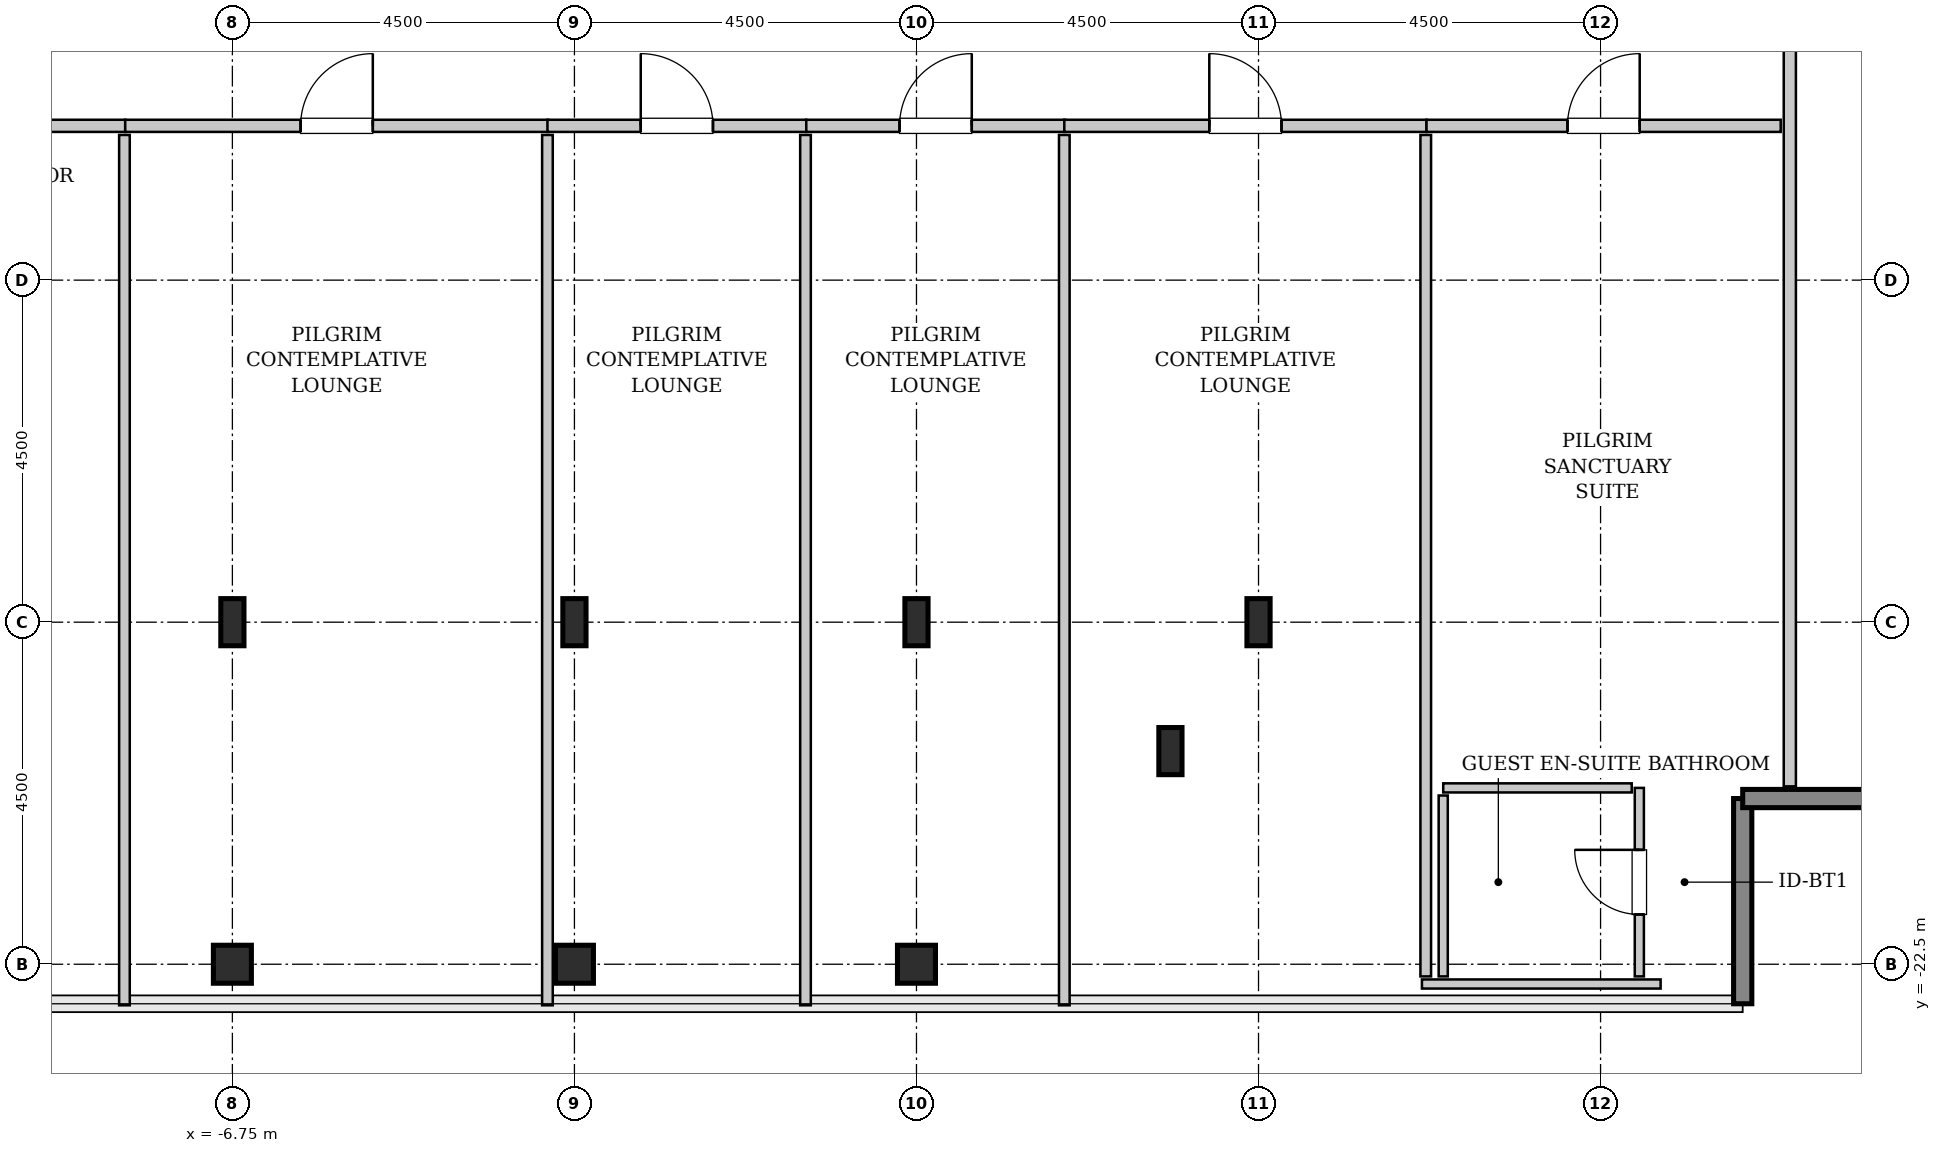
"""IFC4 building model, lengths in metres.
Left out: names, types, materials, properties, quantities, classifications, styles, units other than length and angle.
Written with IfcOpenShell. Run it as: python <this file> out.ifc"""

import sys

from ifc_helpers import new_model, si_unit, direction, frame, frame_2d, origin, origin_2d, place, context, subcontext, project, spatial, rectangle, hollow_rectangle, i_section, extrude, source, transform, mapped, element, fill, save


model = new_model("IFC4")
c1 = context("Model", 3, precision=1e-05, world=origin(), true_north=direction((0.0, 1.0)))
c2 = subcontext(c1, "Body", "Model", "MODEL_VIEW")
j1 = project(units=[si_unit("LENGTHUNIT", "METRE"), si_unit("PLANEANGLEUNIT", "RADIAN")], contexts=[c1])
p1 = place(None, origin())
s1 = spatial("IfcSite", under=j1, at=p1, CompositionType="ELEMENT")
p2 = place(p1, origin())
s2 = spatial("IfcBuilding", under=s1, at=p2, CompositionType="ELEMENT")
p3 = place(p2, frame((0.0, 0.0, 337.6)))
s3 = spatial("IfcBuildingStorey", under=s2, at=p3, CompositionType="ELEMENT", Elevation=337.6)
m1 = source(origin(), c2, "Body", "SweptSolid", [
    extrude(hollow_rectangle(XDim=0.5, YDim=0.5, WallThickness=0.025, InnerFilletRadius=0.025, OuterFilletRadius=0.05, at=origin_2d()), origin(), (0.0, 0.0, 1.0), 3.8),
])
p4 = place(p3, frame((-6.75, -22.5, 0.0), z_axis=(0.0, 0.0, 1.0), x_axis=(1.0, 0.0, 0.0)))
e1 = element("IfcColumn", 1, at=p4, inside=s3, PredefinedType="COLUMN", context=c2, shape_type="MappedRepresentation", body=[
    mapped(m1, transform((0.0, 0.0, 0.0), x_axis=(1.0, 0.0, 0.0), y_axis=(0.0, 1.0, 0.0), z_axis=(0.0, 0.0, 1.0), scale=1.0)),
])
m2 = source(origin(), c2, "Body", "SweptSolid", [
    extrude(i_section(OverallWidth=0.305, OverallDepth=0.62, WebThickness=0.021, FlangeThickness=0.04, FilletRadius=0.027, at=origin_2d()), origin(), (0.0, 0.0, 1.0), 3.8),
])
p5 = place(p3, frame((-6.75, -18.0, 0.0), z_axis=(0.0, 0.0, 1.0), x_axis=(1.0, 0.0, 0.0)))
e2 = element("IfcColumn", 2, at=p5, inside=s3, PredefinedType="COLUMN", context=c2, shape_type="MappedRepresentation", body=[
    mapped(m2, transform((0.0, 0.0, 0.0), x_axis=(1.0, 0.0, 0.0), y_axis=(0.0, 1.0, 0.0), z_axis=(0.0, 0.0, 1.0), scale=1.0)),
])
p6 = place(p3, frame((-2.25, -22.5, 0.0), z_axis=(0.0, 0.0, 1.0), x_axis=(1.0, 0.0, 0.0)))
e3 = element("IfcColumn", 3, at=p6, inside=s3, PredefinedType="COLUMN", context=c2, shape_type="MappedRepresentation", body=[
    mapped(m1, transform((0.0, 0.0, 0.0), x_axis=(1.0, 0.0, 0.0), y_axis=(0.0, 1.0, 0.0), z_axis=(0.0, 0.0, 1.0), scale=1.0)),
])
p7 = place(p3, frame((-2.25, -18.0, 0.0), z_axis=(0.0, 0.0, 1.0), x_axis=(1.0, 0.0, 0.0)))
e4 = element("IfcColumn", 4, at=p7, inside=s3, PredefinedType="COLUMN", context=c2, shape_type="MappedRepresentation", body=[
    mapped(m2, transform((0.0, 0.0, 0.0), x_axis=(1.0, 0.0, 0.0), y_axis=(0.0, 1.0, 0.0), z_axis=(0.0, 0.0, 1.0), scale=1.0)),
])
p8 = place(p3, frame((2.25, -22.5, 0.0), z_axis=(0.0, 0.0, 1.0), x_axis=(1.0, 0.0, 0.0)))
e5 = element("IfcColumn", 5, at=p8, inside=s3, PredefinedType="COLUMN", context=c2, shape_type="MappedRepresentation", body=[
    mapped(m1, transform((0.0, 0.0, 0.0), x_axis=(1.0, 0.0, 0.0), y_axis=(0.0, 1.0, 0.0), z_axis=(0.0, 0.0, 1.0), scale=1.0)),
])
for number, where, z_axis, x_axis in (
    (6, (2.25, -18.0, 0.0), (0.0, 0.0, 1.0), (1.0, 0.0, 0.0)),
    (7, (5.591, -19.696, 0.0), (0.0, 0.0, 1.0), (1.0, 0.0, 0.0)),
    (8, (6.75, -18.0, 0.0), (0.0, 0.0, 1.0), (1.0, 0.0, 0.0)),
):
    element("IfcColumn", number, at=place(p3, frame(where, z_axis=z_axis, x_axis=x_axis)), inside=s3, PredefinedType="COLUMN", context=c2, shape_type="MappedRepresentation", body=[
        mapped(m2, transform((0.0, 0.0, 0.0), x_axis=(1.0, 0.0, 0.0), y_axis=(0.0, 1.0, 0.0), z_axis=(0.0, 0.0, 1.0), scale=1.0)),
    ])
m3 = source(origin(), c2, "Body", "SweptSolid", [
    extrude(rectangle(XDim=2.7, YDim=0.24, at=frame_2d((1.35, 0.0))), origin(), (0.0, 0.0, 1.0), 3.55),
])
for number, where, z_axis, x_axis in (
    (9, (13.12, -23.02, 0.0), (0.0, 0.0, 1.0), (0.0, 1.0, 0.0)),
    (10, (13.12, -20.32, 0.0), (0.0, 0.0, 1.0), (1.0, 0.0, 0.0)),
):
    element("IfcWall", number, at=place(p3, frame(where, z_axis=z_axis, x_axis=x_axis)), inside=s3, PredefinedType="SHEAR", context=c2, shape_type="MappedRepresentation", body=[
        mapped(m3, transform((0.0, 0.0, 0.0), x_axis=(1.0, 0.0, 0.0), y_axis=(0.0, 1.0, 0.0), z_axis=(0.0, 0.0, 1.0), scale=1.0)),
    ])
m4 = source(origin(), c2, "Body", "SweptSolid", [
    extrude(rectangle(XDim=3.14, YDim=0.12, at=frame_2d((1.57, 0.0))), origin(), (0.0, 0.0, 1.0), 3.535),
])
p9 = place(p3, frame((8.9, -22.76, 0.0), z_axis=(0.0, 0.0, 1.0), x_axis=(1.0, 0.0, 0.0)))
e11 = element("IfcWall", 11, at=p9, inside=s3, PredefinedType="PLUMBINGWALL", context=c2, shape_type="MappedRepresentation", body=[
    mapped(m4, transform((0.0, 0.0, 0.0), x_axis=(1.0, 0.0, 0.0), y_axis=(0.0, 1.0, 0.0), z_axis=(0.0, 0.0, 1.0), scale=1.0)),
])
m5 = source(origin(), c2, "Body", "SweptSolid", [
    extrude(rectangle(XDim=2.48, YDim=0.12, at=frame_2d((1.24, 0.0))), origin(), (0.0, 0.0, 1.0), 3.535),
])
p10 = place(p3, frame((11.76, -22.66, 0.0), z_axis=(0.0, 0.0, 1.0), x_axis=(0.0, 1.0, 0.0)))
e12 = element("IfcWall", 12, at=p10, inside=s3, PredefinedType="PLUMBINGWALL", context=c2, shape_type="MappedRepresentation", body=[
    mapped(m5, transform((0.0, 0.0, 0.0), x_axis=(1.0, 0.0, 0.0), y_axis=(0.0, 1.0, 0.0), z_axis=(0.0, 0.0, 1.0), scale=1.0)),
])
p11 = place(p10, frame((0.815, 0.0, 0.0)))
e13 = element("IfcOpeningElement", 13, at=p11, cuts=e12, PredefinedType="OPENING", context=c2, shape_type="SweptSolid", body=[
    extrude(rectangle(XDim=0.85, YDim=2.1, at=frame_2d((0.425, 1.05))), frame((0.0, 0.07, 0.0), z_axis=(0.0, -1.0, 0.0), x_axis=(1.0, 0.0, 0.0)), (0.0, 0.0, 1.0), 0.14),
])
p12 = place(p3, frame((9.18, -20.18, 0.0), z_axis=(0.0, 0.0, 1.0), x_axis=(1.0, 0.0, 0.0)))
e14 = element("IfcWall", 14, at=p12, inside=s3, PredefinedType="PLUMBINGWALL", context=c2, shape_type="MappedRepresentation", body=[
    mapped(m5, transform((0.0, 0.0, 0.0), x_axis=(1.0, 0.0, 0.0), y_axis=(0.0, 1.0, 0.0), z_axis=(0.0, 0.0, 1.0), scale=1.0)),
])
m6 = source(origin(), c2, "Body", "SweptSolid", [
    extrude(rectangle(XDim=2.38, YDim=0.12, at=frame_2d((1.19, 0.0))), origin(), (0.0, 0.0, 1.0), 3.535),
])
p13 = place(p3, frame((9.18, -22.66, 0.0), z_axis=(0.0, 0.0, 1.0), x_axis=(0.0, 1.0, 0.0)))
e15 = element("IfcWall", 15, at=p13, inside=s3, PredefinedType="PLUMBINGWALL", context=c2, shape_type="MappedRepresentation", body=[
    mapped(m6, transform((0.0, 0.0, 0.0), x_axis=(1.0, 0.0, 0.0), y_axis=(0.0, 1.0, 0.0), z_axis=(0.0, 0.0, 1.0), scale=1.0)),
])
m7 = source(origin(), c2, "Body", "SweptSolid", [
    extrude(rectangle(XDim=16.965, YDim=0.16, at=frame_2d((8.482, 0.0))), origin(), (0.0, 0.0, 1.0), 3.535),
])
p14 = place(p3, frame((13.74, -20.16, 0.0), z_axis=(0.0, 0.0, 1.0), x_axis=(0.0, 1.0, 0.0)))
e16 = element("IfcWall", 16, at=p14, inside=s3, PredefinedType="PARTITIONING", context=c2, shape_type="MappedRepresentation", body=[
    mapped(m7, transform((0.0, 0.0, 0.0), x_axis=(1.0, 0.0, 0.0), y_axis=(0.0, 1.0, 0.0), z_axis=(0.0, 0.0, 1.0), scale=1.0)),
])
p15 = place(p14, frame((12.333, 0.0, 0.0)))
e17 = element("IfcOpeningElement", 17, at=p15, cuts=e16, PredefinedType="OPENING", context=c2, shape_type="SweptSolid", body=[
    extrude(rectangle(XDim=0.95, YDim=2.1, at=frame_2d((0.475, 1.05))), frame((0.0, 0.09, 0.0), z_axis=(0.0, -1.0, 0.0), x_axis=(1.0, 0.0, 0.0)), (0.0, 0.0, 1.0), 0.18),
])
m8 = source(origin(), c2, "Body", "SweptSolid", [
    extrude(rectangle(XDim=5.46, YDim=0.16, at=frame_2d((2.73, 0.0))), origin(), (0.0, 0.0, 1.0), 3.535),
])
p16 = place(p3, frame((-13.62, -11.47, 0.0), z_axis=(0.0, 0.0, 1.0), x_axis=(1.0, 0.0, 0.0)))
e18 = element("IfcWall", 18, at=p16, inside=s3, PredefinedType="PARTITIONING", context=c2, shape_type="MappedRepresentation", body=[
    mapped(m8, transform((0.0, 0.0, 0.0), x_axis=(1.0, 0.0, 0.0), y_axis=(0.0, 1.0, 0.0), z_axis=(0.0, 0.0, 1.0), scale=1.0)),
])
p17 = place(p16, frame((2.255, 0.0, 0.0)))
e19 = element("IfcOpeningElement", 19, at=p17, cuts=e18, PredefinedType="OPENING", context=c2, shape_type="SweptSolid", body=[
    extrude(rectangle(XDim=0.95, YDim=2.1, at=frame_2d((0.475, 1.05))), frame((0.0, 0.09, 0.0), z_axis=(0.0, -1.0, 0.0), x_axis=(1.0, 0.0, 0.0)), (0.0, 0.0, 1.0), 0.18),
])
m9 = source(origin(), c2, "Body", "SweptSolid", [
    extrude(rectangle(XDim=11.45, YDim=0.14, at=frame_2d((5.725, 0.0))), origin(), (0.0, 0.0, 1.0), 3.535),
])
p18 = place(p3, frame((-8.17, -23.04, 0.0), z_axis=(0.0, 0.0, 1.0), x_axis=(0.0, 1.0, 0.0)))
e20 = element("IfcWall", 20, at=p18, inside=s3, PredefinedType="PARTITIONING", context=c2, shape_type="MappedRepresentation", body=[
    mapped(m9, transform((0.0, 0.0, 0.0), x_axis=(1.0, 0.0, 0.0), y_axis=(0.0, 1.0, 0.0), z_axis=(0.0, 0.0, 1.0), scale=1.0)),
])
m10 = source(origin(), c2, "Body", "SweptSolid", [
    extrude(rectangle(XDim=5.565, YDim=0.16, at=frame_2d((2.782, 0.0))), origin(), (0.0, 0.0, 1.0), 3.535),
])
p19 = place(p3, frame((-8.16, -11.47, 0.0), z_axis=(0.0, 0.0, 1.0), x_axis=(1.0, 0.0, 0.0)))
e21 = element("IfcWall", 21, at=p19, inside=s3, PredefinedType="PARTITIONING", context=c2, shape_type="MappedRepresentation", body=[
    mapped(m10, transform((0.0, 0.0, 0.0), x_axis=(1.0, 0.0, 0.0), y_axis=(0.0, 1.0, 0.0), z_axis=(0.0, 0.0, 1.0), scale=1.0)),
])
p20 = place(p19, frame((2.308, 0.0, 0.0)))
e22 = element("IfcOpeningElement", 22, at=p20, cuts=e21, PredefinedType="OPENING", context=c2, shape_type="SweptSolid", body=[
    extrude(rectangle(XDim=0.95, YDim=2.1, at=frame_2d((0.475, 1.05))), frame((0.0, 0.09, 0.0), z_axis=(0.0, -1.0, 0.0), x_axis=(1.0, 0.0, 0.0)), (0.0, 0.0, 1.0), 0.18),
])
m11 = source(origin(), c2, "Body", "SweptSolid", [
    extrude(rectangle(XDim=11.45, YDim=0.14, at=frame_2d((5.725, 0.0))), origin(), (0.0, 0.0, 1.0), 2.975),
])
p21 = place(p3, frame((-2.605, -23.04, 0.0), z_axis=(0.0, 0.0, 1.0), x_axis=(0.0, 1.0, 0.0)))
e23 = element("IfcWall", 23, at=p21, inside=s3, PredefinedType="PARTITIONING", context=c2, shape_type="MappedRepresentation", body=[
    mapped(m11, transform((0.0, 0.0, 0.0), x_axis=(1.0, 0.0, 0.0), y_axis=(0.0, 1.0, 0.0), z_axis=(0.0, 0.0, 1.0), scale=1.0)),
])
m12 = source(origin(), c2, "Body", "SweptSolid", [
    extrude(rectangle(XDim=3.405, YDim=0.16, at=frame_2d((1.703, 0.0))), origin(), (0.0, 0.0, 1.0), 3.535),
])
p22 = place(p3, frame((-2.605, -11.47, 0.0), z_axis=(0.0, 0.0, 1.0), x_axis=(1.0, 0.0, 0.0)))
e24 = element("IfcWall", 24, at=p22, inside=s3, PredefinedType="PARTITIONING", context=c2, shape_type="MappedRepresentation", body=[
    mapped(m12, transform((0.0, 0.0, 0.0), x_axis=(1.0, 0.0, 0.0), y_axis=(0.0, 1.0, 0.0), z_axis=(0.0, 0.0, 1.0), scale=1.0)),
])
p23 = place(p22, frame((1.228, 0.0, 0.0)))
e25 = element("IfcOpeningElement", 25, at=p23, cuts=e24, PredefinedType="OPENING", context=c2, shape_type="SweptSolid", body=[
    extrude(rectangle(XDim=0.95, YDim=2.1, at=frame_2d((0.475, 1.05))), frame((0.0, 0.09, 0.0), z_axis=(0.0, -1.0, 0.0), x_axis=(1.0, 0.0, 0.0)), (0.0, 0.0, 1.0), 0.18),
])
p24 = place(p3, frame((0.79, -23.04, 0.0), z_axis=(0.0, 0.0, 1.0), x_axis=(0.0, 1.0, 0.0)))
e26 = element("IfcWall", 26, at=p24, inside=s3, PredefinedType="PARTITIONING", context=c2, shape_type="MappedRepresentation", body=[
    mapped(m9, transform((0.0, 0.0, 0.0), x_axis=(1.0, 0.0, 0.0), y_axis=(0.0, 1.0, 0.0), z_axis=(0.0, 0.0, 1.0), scale=1.0)),
])
p25 = place(p3, frame((0.8, -11.47, 0.0), z_axis=(0.0, 0.0, 1.0), x_axis=(1.0, 0.0, 0.0)))
e27 = element("IfcWall", 27, at=p25, inside=s3, PredefinedType="PARTITIONING", context=c2, shape_type="MappedRepresentation", body=[
    mapped(m12, transform((0.0, 0.0, 0.0), x_axis=(1.0, 0.0, 0.0), y_axis=(0.0, 1.0, 0.0), z_axis=(0.0, 0.0, 1.0), scale=1.0)),
])
p26 = place(p25, frame((1.228, 0.0, 0.0)))
e28 = element("IfcOpeningElement", 28, at=p26, cuts=e27, PredefinedType="OPENING", context=c2, shape_type="SweptSolid", body=[
    extrude(rectangle(XDim=0.95, YDim=2.1, at=frame_2d((0.475, 1.05))), frame((0.0, 0.09, 0.0), z_axis=(0.0, -1.0, 0.0), x_axis=(1.0, 0.0, 0.0)), (0.0, 0.0, 1.0), 0.18),
])
p27 = place(p3, frame((4.195, -23.04, 0.0), z_axis=(0.0, 0.0, 1.0), x_axis=(0.0, 1.0, 0.0)))
e29 = element("IfcWall", 29, at=p27, inside=s3, PredefinedType="PARTITIONING", context=c2, shape_type="MappedRepresentation", body=[
    mapped(m9, transform((0.0, 0.0, 0.0), x_axis=(1.0, 0.0, 0.0), y_axis=(0.0, 1.0, 0.0), z_axis=(0.0, 0.0, 1.0), scale=1.0)),
])
m13 = source(origin(), c2, "Body", "SweptSolid", [
    extrude(rectangle(XDim=4.765, YDim=0.16, at=frame_2d((2.382, 0.0))), origin(), (0.0, 0.0, 1.0), 3.535),
])
p28 = place(p3, frame((4.195, -11.47, 0.0), z_axis=(0.0, 0.0, 1.0), x_axis=(1.0, 0.0, 0.0)))
e30 = element("IfcWall", 30, at=p28, inside=s3, PredefinedType="PARTITIONING", context=c2, shape_type="MappedRepresentation", body=[
    mapped(m13, transform((0.0, 0.0, 0.0), x_axis=(1.0, 0.0, 0.0), y_axis=(0.0, 1.0, 0.0), z_axis=(0.0, 0.0, 1.0), scale=1.0)),
])
p29 = place(p28, frame((1.907, 0.0, 0.0)))
e31 = element("IfcOpeningElement", 31, at=p29, cuts=e30, PredefinedType="OPENING", context=c2, shape_type="SweptSolid", body=[
    extrude(rectangle(XDim=0.95, YDim=2.1, at=frame_2d((0.475, 1.05))), frame((0.0, 0.09, 0.0), z_axis=(0.0, -1.0, 0.0), x_axis=(1.0, 0.0, 0.0)), (0.0, 0.0, 1.0), 0.18),
])
m14 = source(origin(), c2, "Body", "SweptSolid", [
    extrude(rectangle(XDim=11.07, YDim=0.14, at=frame_2d((5.535, 0.0))), origin(), (0.0, 0.0, 1.0), 3.535),
])
p30 = place(p3, frame((8.95, -22.66, 0.0), z_axis=(0.0, 0.0, 1.0), x_axis=(0.0, 1.0, 0.0)))
e32 = element("IfcWall", 32, at=p30, inside=s3, PredefinedType="PARTITIONING", context=c2, shape_type="MappedRepresentation", body=[
    mapped(m14, transform((0.0, 0.0, 0.0), x_axis=(1.0, 0.0, 0.0), y_axis=(0.0, 1.0, 0.0), z_axis=(0.0, 0.0, 1.0), scale=1.0)),
])
m15 = source(origin(), c2, "Body", "SweptSolid", [
    extrude(rectangle(XDim=4.66, YDim=0.16, at=frame_2d((2.33, 0.0))), origin(), (0.0, 0.0, 1.0), 3.535),
])
p31 = place(p3, frame((8.96, -11.47, 0.0), z_axis=(0.0, 0.0, 1.0), x_axis=(1.0, 0.0, 0.0)))
e33 = element("IfcWall", 33, at=p31, inside=s3, PredefinedType="PARTITIONING", context=c2, shape_type="MappedRepresentation", body=[
    mapped(m15, transform((0.0, 0.0, 0.0), x_axis=(1.0, 0.0, 0.0), y_axis=(0.0, 1.0, 0.0), z_axis=(0.0, 0.0, 1.0), scale=1.0)),
])
p32 = place(p31, frame((1.855, 0.0, 0.0)))
e34 = element("IfcOpeningElement", 34, at=p32, cuts=e33, PredefinedType="OPENING", context=c2, shape_type="SweptSolid", body=[
    extrude(rectangle(XDim=0.95, YDim=2.1, at=frame_2d((0.475, 1.05))), frame((0.0, 0.09, 0.0), z_axis=(0.0, -1.0, 0.0), x_axis=(1.0, 0.0, 0.0)), (0.0, 0.0, 1.0), 0.18),
])
m16 = source(origin(), c2, "Body", "SweptSolid", [
    extrude(rectangle(XDim=0.85, YDim=2.1, at=frame_2d((0.425, 1.05))), frame((0.0, 0.025, 0.0), z_axis=(0.0, -1.0, 0.0), x_axis=(1.0, 0.0, 0.0)), (0.0, 0.0, 1.0), 0.05),
])
p33 = place(p11, origin())
e35 = element("IfcDoor", 35, at=p33, inside=s3, OperationType="SINGLE_SWING_RIGHT", PredefinedType="DOOR", context=c2, shape_type="MappedRepresentation", body=[
    mapped(m16, transform((0.0, 0.0, 0.0), x_axis=(1.0, 0.0, 0.0), y_axis=(0.0, 1.0, 0.0), z_axis=(0.0, 0.0, 1.0), scale=1.0)),
])
fill(e13, e35)
m17 = source(origin(), c2, "Body", "SweptSolid", [
    extrude(rectangle(XDim=0.95, YDim=2.1, at=frame_2d((0.475, 1.05))), frame((0.0, 0.025, 0.0), z_axis=(0.0, -1.0, 0.0), x_axis=(1.0, 0.0, 0.0)), (0.0, 0.0, 1.0), 0.05),
])
p34 = place(p20, origin())
e36 = element("IfcDoor", 36, at=p34, inside=s3, OperationType="SINGLE_SWING_RIGHT", PredefinedType="DOOR", context=c2, shape_type="MappedRepresentation", body=[
    mapped(m17, transform((0.0, 0.0, 0.0), x_axis=(1.0, 0.0, 0.0), y_axis=(0.0, 1.0, 0.0), z_axis=(0.0, 0.0, 1.0), scale=1.0)),
])
fill(e22, e36)
p35 = place(p23, origin())
e37 = element("IfcDoor", 37, at=p35, inside=s3, OperationType="SINGLE_SWING_LEFT", PredefinedType="DOOR", context=c2, shape_type="MappedRepresentation", body=[
    mapped(m17, transform((0.0, 0.0, 0.0), x_axis=(1.0, 0.0, 0.0), y_axis=(0.0, 1.0, 0.0), z_axis=(0.0, 0.0, 1.0), scale=1.0)),
])
fill(e25, e37)
p36 = place(p26, origin())
e38 = element("IfcDoor", 38, at=p36, inside=s3, OperationType="SINGLE_SWING_RIGHT", PredefinedType="DOOR", context=c2, shape_type="MappedRepresentation", body=[
    mapped(m17, transform((0.0, 0.0, 0.0), x_axis=(1.0, 0.0, 0.0), y_axis=(0.0, 1.0, 0.0), z_axis=(0.0, 0.0, 1.0), scale=1.0)),
])
fill(e28, e38)
p37 = place(p29, origin())
e39 = element("IfcDoor", 39, at=p37, inside=s3, OperationType="SINGLE_SWING_LEFT", PredefinedType="DOOR", context=c2, shape_type="MappedRepresentation", body=[
    mapped(m17, transform((0.0, 0.0, 0.0), x_axis=(1.0, 0.0, 0.0), y_axis=(0.0, 1.0, 0.0), z_axis=(0.0, 0.0, 1.0), scale=1.0)),
])
fill(e31, e39)
p38 = place(p32, origin())
e40 = element("IfcDoor", 40, at=p38, inside=s3, OperationType="SINGLE_SWING_RIGHT", PredefinedType="DOOR", context=c2, shape_type="MappedRepresentation", body=[
    mapped(m17, transform((0.0, 0.0, 0.0), x_axis=(1.0, 0.0, 0.0), y_axis=(0.0, 1.0, 0.0), z_axis=(0.0, 0.0, 1.0), scale=1.0)),
])
fill(e34, e40)
save(model, sys.argv[1])
